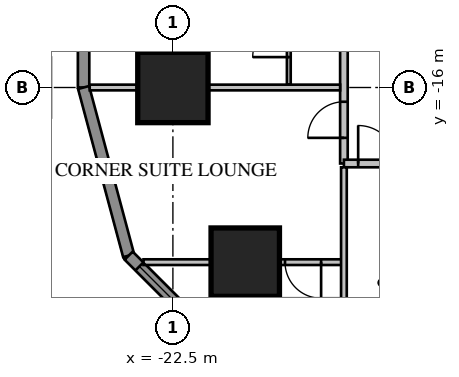
"""IFC4 building model, lengths in metres.
Left out: names, types, materials, properties, quantities, classifications, styles, units other than length and angle.
Written with IfcOpenShell. Run it as: python <this file> out.ifc"""

import sys

from ifc_helpers import new_model, si_unit, direction, frame, frame_2d, origin, origin_2d, place, context, subcontext, project, spatial, rectangle, extrude, element, fill, save


model = new_model("IFC4")
c1 = context("Model", 3, precision=1e-05, world=origin(), true_north=direction((0.0, 1.0)))
c2 = subcontext(c1, "Body", "Model", "MODEL_VIEW")
j1 = project(units=[si_unit("LENGTHUNIT", "METRE"), si_unit("PLANEANGLEUNIT", "RADIAN")], contexts=[c1])
p1 = place(None, origin())
s1 = spatial("IfcSite", under=j1, at=p1, CompositionType="ELEMENT")
p2 = place(p1, origin())
s2 = spatial("IfcBuilding", under=s1, at=p2, CompositionType="ELEMENT")
p3 = place(p2, frame((0.0, 0.0, 35.25)))
s3 = spatial("IfcBuildingStorey", under=s2, at=p3, CompositionType="ELEMENT", Elevation=35.25)
p4 = place(p3, frame((-22.5, -16.0, 0.0), z_axis=(0.0, 0.0, 1.0), x_axis=(1.0, 0.0, 0.0)))
e1 = element("IfcColumn", 1, at=p4, inside=s3, PredefinedType="COLUMN", context=c2, shape_type="SweptSolid", body=[
    extrude(rectangle(XDim=1.85, YDim=1.85, at=origin_2d()), origin(), (0.0, 0.0, 1.0), 3.85),
])
p5 = place(p3, frame((-20.596, -20.596, 0.0), z_axis=(0.0, 0.0, 1.0), x_axis=(1.0, 0.0, 0.0)))
e2 = element("IfcColumn", 2, at=p5, inside=s3, PredefinedType="COLUMN", context=c2, shape_type="SweptSolid", body=[
    extrude(rectangle(XDim=1.8, YDim=1.8, at=origin_2d()), origin(), (0.0, 0.0, 1.0), 3.85),
])
p6 = place(p3, frame((-24.85, 16.0, 0.0), z_axis=(0.0, 0.0, 1.0), x_axis=(0.0, -1.0, 0.0)))
e3 = element("IfcWall", 3, at=p6, inside=s3, PredefinedType="SOLIDWALL", context=c2, shape_type="SweptSolid", body=[
    extrude(rectangle(XDim=32.0, YDim=0.3, at=frame_2d((16.0, 0.0))), origin(), (0.0, 0.0, 1.0), 3.65),
])
p7 = place(p6, frame((1.2, 0.0, 0.75)))
e4 = element("IfcOpeningElement", 4, at=p7, cuts=e3, PredefinedType="OPENING", context=c2, shape_type="SweptSolid", body=[
    extrude(rectangle(XDim=1.6, YDim=1.8, at=frame_2d((0.8, 0.9))), frame((0.0, 0.17, 0.0), z_axis=(0.0, -1.0, 0.0), x_axis=(1.0, 0.0, 0.0)), (0.0, 0.0, 1.0), 0.34),
])
p8 = place(p6, frame((5.2, 0.0, 0.75)))
e5 = element("IfcOpeningElement", 5, at=p8, cuts=e3, PredefinedType="OPENING", context=c2, shape_type="SweptSolid", body=[
    extrude(rectangle(XDim=1.6, YDim=1.8, at=frame_2d((0.8, 0.9))), frame((0.0, 0.17, 0.0), z_axis=(0.0, -1.0, 0.0), x_axis=(1.0, 0.0, 0.0)), (0.0, 0.0, 1.0), 0.34),
])
p9 = place(p6, frame((17.2, 0.0, 0.75)))
e6 = element("IfcOpeningElement", 6, at=p9, cuts=e3, PredefinedType="OPENING", context=c2, shape_type="SweptSolid", body=[
    extrude(rectangle(XDim=1.6, YDim=1.8, at=frame_2d((0.8, 0.9))), frame((0.0, 0.17, 0.0), z_axis=(0.0, -1.0, 0.0), x_axis=(1.0, 0.0, 0.0)), (0.0, 0.0, 1.0), 0.34),
])
p10 = place(p6, frame((21.2, 0.0, 0.75)))
e7 = element("IfcOpeningElement", 7, at=p10, cuts=e3, PredefinedType="OPENING", context=c2, shape_type="SweptSolid", body=[
    extrude(rectangle(XDim=1.6, YDim=1.8, at=frame_2d((0.8, 0.9))), frame((0.0, 0.17, 0.0), z_axis=(0.0, -1.0, 0.0), x_axis=(1.0, 0.0, 0.0)), (0.0, 0.0, 1.0), 0.34),
])
p11 = place(p6, frame((25.2, 0.0, 0.75)))
e8 = element("IfcOpeningElement", 8, at=p11, cuts=e3, PredefinedType="OPENING", context=c2, shape_type="SweptSolid", body=[
    extrude(rectangle(XDim=1.6, YDim=1.8, at=frame_2d((0.8, 0.9))), frame((0.0, 0.17, 0.0), z_axis=(0.0, -1.0, 0.0), x_axis=(1.0, 0.0, 0.0)), (0.0, 0.0, 1.0), 0.34),
])
p12 = place(p6, frame((29.2, 0.0, 0.75)))
e9 = element("IfcOpeningElement", 9, at=p12, cuts=e3, PredefinedType="OPENING", context=c2, shape_type="SweptSolid", body=[
    extrude(rectangle(XDim=1.6, YDim=1.8, at=frame_2d((0.8, 0.9))), frame((0.0, 0.17, 0.0), z_axis=(0.0, -1.0, 0.0), x_axis=(1.0, 0.0, 0.0)), (0.0, 0.0, 1.0), 0.34),
])
p13 = place(p6, frame((8.8, 0.0, 0.75)))
e10 = element("IfcOpeningElement", 10, at=p13, cuts=e3, PredefinedType="OPENING", context=c2, shape_type="SweptSolid", body=[
    extrude(rectangle(XDim=2.4, YDim=1.8, at=frame_2d((1.2, 0.9))), frame((0.0, 0.17, 0.0), z_axis=(0.0, -1.0, 0.0), x_axis=(1.0, 0.0, 0.0)), (0.0, 0.0, 1.0), 0.34),
])
p14 = place(p6, frame((13.812, 0.0, 0.0)))
e11 = element("IfcOpeningElement", 11, at=p14, cuts=e3, PredefinedType="OPENING", context=c2, shape_type="SweptSolid", body=[
    extrude(rectangle(XDim=1.0, YDim=2.4, at=frame_2d((0.5, 1.2))), frame((0.0, 0.17, 0.0), z_axis=(0.0, -1.0, 0.0), x_axis=(1.0, 0.0, 0.0)), (0.0, 0.0, 1.0), 0.34),
])
p15 = place(p3, frame((-24.85, -16.0, 0.0), z_axis=(0.0, 0.0, 1.0), x_axis=(0.258839972501, -0.965920218567, 0.0)))
e12 = element("IfcWall", 12, at=p15, inside=s3, PredefinedType="SOLIDWALL", context=c2, shape_type="SweptSolid", body=[
    extrude(rectangle(XDim=4.581, YDim=0.3, at=frame_2d((2.291, 0.0))), origin(), (0.0, 0.0, 1.0), 3.65),
])
p16 = place(p3, frame((-23.664, -20.425, 0.0), z_axis=(0.0, 0.0, 1.0), x_axis=(0.707106781187, -0.707106781187, 0.0)))
e13 = element("IfcWall", 13, at=p16, inside=s3, PredefinedType="SOLIDWALL", context=c2, shape_type="SweptSolid", body=[
    extrude(rectangle(XDim=4.581, YDim=0.3, at=frame_2d((2.291, 0.0))), origin(), (0.0, 0.0, 1.0), 3.65),
])
p17 = place(p16, frame((0.4, 0.0, 0.75)))
e14 = element("IfcOpeningElement", 14, at=p17, cuts=e13, PredefinedType="OPENING", context=c2, shape_type="SweptSolid", body=[
    extrude(rectangle(XDim=3.781, YDim=1.8, at=frame_2d((1.891, 0.9))), frame((0.0, 0.17, 0.0), z_axis=(0.0, -1.0, 0.0), x_axis=(1.0, 0.0, 0.0)), (0.0, 0.0, 1.0), 0.34),
])
p18 = place(p3, frame((-18.0, 18.0, 0.0), z_axis=(0.0, 0.0, 1.0), x_axis=(0.0, -1.0, 0.0)))
e15 = element("IfcWall", 15, at=p18, inside=s3, PredefinedType="PARTITIONING", context=c2, shape_type="SweptSolid", body=[
    extrude(rectangle(XDim=36.0, YDim=0.2, at=frame_2d((18.0, 0.0))), origin(), (0.0, 0.0, 1.0), 3.65),
])
p19 = place(p18, frame((10.4, 0.0, 0.0)))
e16 = element("IfcOpeningElement", 16, at=p19, cuts=e15, PredefinedType="OPENING", context=c2, shape_type="SweptSolid", body=[
    extrude(rectangle(XDim=1.0, YDim=2.1, at=frame_2d((0.5, 1.05))), frame((0.0, 0.12, 0.0), z_axis=(0.0, -1.0, 0.0), x_axis=(1.0, 0.0, 0.0)), (0.0, 0.0, 1.0), 0.24),
])
p20 = place(p18, frame((0.375, 0.0, 0.0)))
e17 = element("IfcOpeningElement", 17, at=p20, cuts=e15, PredefinedType="OPENING", context=c2, shape_type="SweptSolid", body=[
    extrude(rectangle(XDim=1.0, YDim=2.1, at=frame_2d((0.5, 1.05))), frame((0.0, 0.12, 0.0), z_axis=(0.0, -1.0, 0.0), x_axis=(1.0, 0.0, 0.0)), (0.0, 0.0, 1.0), 0.24),
])
p21 = place(p18, frame((34.375, 0.0, 0.0)))
e18 = element("IfcOpeningElement", 18, at=p21, cuts=e15, PredefinedType="OPENING", context=c2, shape_type="SweptSolid", body=[
    extrude(rectangle(XDim=0.95, YDim=2.1, at=frame_2d((0.475, 1.05))), frame((0.0, 0.12, 0.0), z_axis=(0.0, -1.0, 0.0), x_axis=(1.0, 0.0, 0.0)), (0.0, 0.0, 1.0), 0.24),
])
p22 = place(p3, frame((-19.45, 15.925, 0.0), z_axis=(0.0, 0.0, 1.0), x_axis=(0.0, -1.0, 0.0)))
e19 = element("IfcWall", 19, at=p22, inside=s3, PredefinedType="PARTITIONING", context=c2, shape_type="SweptSolid", body=[
    extrude(rectangle(XDim=31.85, YDim=0.1, at=frame_2d((15.925, 0.0))), origin(), (0.0, 0.0, 1.0), 3.65),
])
p23 = place(p22, frame((10.125, 0.0, 0.0)))
e20 = element("IfcOpeningElement", 20, at=p23, cuts=e19, PredefinedType="OPENING", context=c2, shape_type="SweptSolid", body=[
    extrude(rectangle(XDim=1.0, YDim=2.1, at=frame_2d((0.5, 1.05))), frame((0.0, 0.07, 0.0), z_axis=(0.0, -1.0, 0.0), x_axis=(1.0, 0.0, 0.0)), (0.0, 0.0, 1.0), 0.14),
])
p24 = place(p22, frame((8.3, 0.0, 0.0)))
e21 = element("IfcOpeningElement", 21, at=p24, cuts=e19, PredefinedType="OPENING", context=c2, shape_type="SweptSolid", body=[
    extrude(rectangle(XDim=0.8, YDim=2.1, at=frame_2d((0.4, 1.05))), frame((0.0, 0.07, 0.0), z_axis=(0.0, -1.0, 0.0), x_axis=(1.0, 0.0, 0.0)), (0.0, 0.0, 1.0), 0.14),
])
p25 = place(p22, frame((0.3, 0.0, 0.0)))
e22 = element("IfcOpeningElement", 22, at=p25, cuts=e19, PredefinedType="OPENING", context=c2, shape_type="SweptSolid", body=[
    extrude(rectangle(XDim=0.95, YDim=2.1, at=frame_2d((0.475, 1.05))), frame((0.0, 0.07, 0.0), z_axis=(0.0, -1.0, 0.0), x_axis=(1.0, 0.0, 0.0)), (0.0, 0.0, 1.0), 0.14),
])
p26 = place(p22, frame((6.175, 0.0, 0.0)))
e23 = element("IfcOpeningElement", 23, at=p26, cuts=e19, PredefinedType="OPENING", context=c2, shape_type="SweptSolid", body=[
    extrude(rectangle(XDim=0.95, YDim=2.1, at=frame_2d((0.475, 1.05))), frame((0.0, 0.07, 0.0), z_axis=(0.0, -1.0, 0.0), x_axis=(1.0, 0.0, 0.0)), (0.0, 0.0, 1.0), 0.14),
])
p27 = place(p22, frame((16.3, 0.0, 0.0)))
e24 = element("IfcOpeningElement", 24, at=p27, cuts=e19, PredefinedType="OPENING", context=c2, shape_type="SweptSolid", body=[
    extrude(rectangle(XDim=0.95, YDim=2.1, at=frame_2d((0.475, 1.05))), frame((0.0, 0.07, 0.0), z_axis=(0.0, -1.0, 0.0), x_axis=(1.0, 0.0, 0.0)), (0.0, 0.0, 1.0), 0.14),
])
p28 = place(p22, frame((22.175, 0.0, 0.0)))
e25 = element("IfcOpeningElement", 25, at=p28, cuts=e19, PredefinedType="OPENING", context=c2, shape_type="SweptSolid", body=[
    extrude(rectangle(XDim=0.95, YDim=2.1, at=frame_2d((0.475, 1.05))), frame((0.0, 0.07, 0.0), z_axis=(0.0, -1.0, 0.0), x_axis=(1.0, 0.0, 0.0)), (0.0, 0.0, 1.0), 0.14),
])
p29 = place(p22, frame((24.3, 0.0, 0.0)))
e26 = element("IfcOpeningElement", 26, at=p29, cuts=e19, PredefinedType="OPENING", context=c2, shape_type="SweptSolid", body=[
    extrude(rectangle(XDim=0.95, YDim=2.1, at=frame_2d((0.475, 1.05))), frame((0.0, 0.07, 0.0), z_axis=(0.0, -1.0, 0.0), x_axis=(1.0, 0.0, 0.0)), (0.0, 0.0, 1.0), 0.14),
])
p30 = place(p22, frame((30.175, 0.0, 0.0)))
e27 = element("IfcOpeningElement", 27, at=p30, cuts=e19, PredefinedType="OPENING", context=c2, shape_type="SweptSolid", body=[
    extrude(rectangle(XDim=0.95, YDim=2.1, at=frame_2d((0.475, 1.05))), frame((0.0, 0.07, 0.0), z_axis=(0.0, -1.0, 0.0), x_axis=(1.0, 0.0, 0.0)), (0.0, 0.0, 1.0), 0.14),
])
p31 = place(p3, frame((-18.1, -16.0, 0.0), z_axis=(0.0, 0.0, 1.0), x_axis=(-1.0, 0.0, 0.0)))
e28 = element("IfcWall", 28, at=p31, inside=s3, PredefinedType="PARTITIONING", context=c2, shape_type="SweptSolid", body=[
    extrude(rectangle(XDim=6.589, YDim=0.15, at=frame_2d((3.295, 0.0))), origin(), (0.0, 0.0, 1.0), 3.65),
])
p32 = place(p3, frame((-18.065, -20.596, 0.0), z_axis=(0.0, 0.0, 1.0), x_axis=(-1.0, 0.0, 0.0)))
e29 = element("IfcWall", 29, at=p32, inside=s3, PredefinedType="PARTITIONING", context=c2, shape_type="SweptSolid", body=[
    extrude(rectangle(XDim=5.209, YDim=0.15, at=frame_2d((2.604, 0.0))), origin(), (0.0, 0.0, 1.0), 3.65),
])
p33 = place(p32, frame((0.535, 0.0, 0.0)))
e30 = element("IfcOpeningElement", 30, at=p33, cuts=e29, PredefinedType="OPENING", context=c2, shape_type="SweptSolid", body=[
    extrude(rectangle(XDim=0.95, YDim=2.1, at=frame_2d((0.475, 1.05))), frame((0.0, 0.095, 0.0), z_axis=(0.0, -1.0, 0.0), x_axis=(1.0, 0.0, 0.0)), (0.0, 0.0, 1.0), 0.19),
])
p34 = place(p3, frame((-18.0, -18.0, 0.0), z_axis=(0.0, 0.0, 1.0), x_axis=(1.0, 0.0, 0.0)))
e31 = element("IfcWall", 31, at=p34, inside=s3, PredefinedType="PARTITIONING", context=c2, shape_type="SweptSolid", body=[
    extrude(rectangle(XDim=36.0, YDim=0.2, at=frame_2d((18.0, 0.0))), origin(), (0.0, 0.0, 1.0), 3.65),
])
p35 = place(p34, frame((0.375, 0.0, 0.0)))
e32 = element("IfcOpeningElement", 32, at=p35, cuts=e31, PredefinedType="OPENING", context=c2, shape_type="SweptSolid", body=[
    extrude(rectangle(XDim=1.0, YDim=2.1, at=frame_2d((0.5, 1.05))), frame((0.0, 0.12, 0.0), z_axis=(0.0, -1.0, 0.0), x_axis=(1.0, 0.0, 0.0)), (0.0, 0.0, 1.0), 0.24),
])
p36 = place(p34, frame((2.45, 0.0, 0.0)))
e33 = element("IfcOpeningElement", 33, at=p36, cuts=e31, PredefinedType="OPENING", context=c2, shape_type="SweptSolid", body=[
    extrude(rectangle(XDim=0.8, YDim=2.1, at=frame_2d((0.4, 1.05))), frame((0.0, 0.12, 0.0), z_axis=(0.0, -1.0, 0.0), x_axis=(1.0, 0.0, 0.0)), (0.0, 0.0, 1.0), 0.24),
])
p37 = place(p34, frame((4.05, 0.0, 0.0)))
e34 = element("IfcOpeningElement", 34, at=p37, cuts=e31, PredefinedType="OPENING", context=c2, shape_type="SweptSolid", body=[
    extrude(rectangle(XDim=1.0, YDim=2.1, at=frame_2d((0.5, 1.05))), frame((0.0, 0.12, 0.0), z_axis=(0.0, -1.0, 0.0), x_axis=(1.0, 0.0, 0.0)), (0.0, 0.0, 1.0), 0.24),
])
p38 = place(p34, frame((6.45, 0.0, 0.0)))
e35 = element("IfcOpeningElement", 35, at=p38, cuts=e31, PredefinedType="OPENING", context=c2, shape_type="SweptSolid", body=[
    extrude(rectangle(XDim=0.9, YDim=2.1, at=frame_2d((0.45, 1.05))), frame((0.0, 0.12, 0.0), z_axis=(0.0, -1.0, 0.0), x_axis=(1.0, 0.0, 0.0)), (0.0, 0.0, 1.0), 0.24),
])
p39 = place(p34, frame((8.15, 0.0, 0.0)))
e36 = element("IfcOpeningElement", 36, at=p39, cuts=e31, PredefinedType="OPENING", context=c2, shape_type="SweptSolid", body=[
    extrude(rectangle(XDim=1.0, YDim=2.1, at=frame_2d((0.5, 1.05))), frame((0.0, 0.12, 0.0), z_axis=(0.0, -1.0, 0.0), x_axis=(1.0, 0.0, 0.0)), (0.0, 0.0, 1.0), 0.24),
])
p40 = place(p34, frame((18.375, 0.0, 0.0)))
e37 = element("IfcOpeningElement", 37, at=p40, cuts=e31, PredefinedType="OPENING", context=c2, shape_type="SweptSolid", body=[
    extrude(rectangle(XDim=0.95, YDim=2.1, at=frame_2d((0.475, 1.05))), frame((0.0, 0.12, 0.0), z_axis=(0.0, -1.0, 0.0), x_axis=(1.0, 0.0, 0.0)), (0.0, 0.0, 1.0), 0.24),
])
p41 = place(p34, frame((24.25, 0.0, 0.0)))
e38 = element("IfcOpeningElement", 38, at=p41, cuts=e31, PredefinedType="OPENING", context=c2, shape_type="SweptSolid", body=[
    extrude(rectangle(XDim=0.95, YDim=2.1, at=frame_2d((0.475, 1.05))), frame((0.0, 0.12, 0.0), z_axis=(0.0, -1.0, 0.0), x_axis=(1.0, 0.0, 0.0)), (0.0, 0.0, 1.0), 0.24),
])
p42 = place(p34, frame((26.375, 0.0, 0.0)))
e39 = element("IfcOpeningElement", 39, at=p42, cuts=e31, PredefinedType="OPENING", context=c2, shape_type="SweptSolid", body=[
    extrude(rectangle(XDim=0.95, YDim=2.1, at=frame_2d((0.475, 1.05))), frame((0.0, 0.12, 0.0), z_axis=(0.0, -1.0, 0.0), x_axis=(1.0, 0.0, 0.0)), (0.0, 0.0, 1.0), 0.24),
])
p43 = place(p34, frame((32.25, 0.0, 0.0)))
e40 = element("IfcOpeningElement", 40, at=p43, cuts=e31, PredefinedType="OPENING", context=c2, shape_type="SweptSolid", body=[
    extrude(rectangle(XDim=0.95, YDim=2.1, at=frame_2d((0.475, 1.05))), frame((0.0, 0.12, 0.0), z_axis=(0.0, -1.0, 0.0), x_axis=(1.0, 0.0, 0.0)), (0.0, 0.0, 1.0), 0.24),
])
p44 = place(p34, frame((34.375, 0.0, 0.0)))
e41 = element("IfcOpeningElement", 41, at=p44, cuts=e31, PredefinedType="OPENING", context=c2, shape_type="SweptSolid", body=[
    extrude(rectangle(XDim=0.95, YDim=2.1, at=frame_2d((0.475, 1.05))), frame((0.0, 0.12, 0.0), z_axis=(0.0, -1.0, 0.0), x_axis=(1.0, 0.0, 0.0)), (0.0, 0.0, 1.0), 0.24),
])
p45 = place(p34, frame((11.2, 0.0, 0.0)))
e42 = element("IfcOpeningElement", 42, at=p45, cuts=e31, PredefinedType="OPENING", context=c2, shape_type="SweptSolid", body=[
    extrude(rectangle(XDim=1.0, YDim=2.1, at=frame_2d((0.5, 1.05))), frame((0.0, 0.12, 0.0), z_axis=(0.0, -1.0, 0.0), x_axis=(1.0, 0.0, 0.0)), (0.0, 0.0, 1.0), 0.24),
])
p46 = place(p3, frame((-18.0, -18.1, 0.0), z_axis=(0.0, 0.0, 1.0), x_axis=(0.0, -1.0, 0.0)))
e43 = element("IfcWall", 43, at=p46, inside=s3, PredefinedType="PARTITIONING", context=c2, shape_type="SweptSolid", body=[
    extrude(rectangle(XDim=6.053, YDim=0.15, at=frame_2d((3.027, 0.0))), origin(), (0.0, 0.0, 1.0), 3.65),
])
p47 = place(p17, origin())
e44 = element("IfcWindow", 44, at=p47, inside=s3, PartitioningType="SINGLE_PANEL", PredefinedType="WINDOW", context=c2, shape_type="SweptSolid", body=[
    extrude(rectangle(XDim=3.781, YDim=1.8, at=frame_2d((1.891, 0.9))), frame((0.0, 0.03, 0.0), z_axis=(0.0, -1.0, 0.0), x_axis=(1.0, 0.0, 0.0)), (0.0, 0.0, 1.0), 0.06),
])
fill(e14, e44)
p48 = place(p30, origin())
e45 = element("IfcDoor", 45, at=p48, inside=s3, OperationType="SINGLE_SWING_RIGHT", PredefinedType="DOOR", context=c2, shape_type="SweptSolid", body=[
    extrude(rectangle(XDim=0.95, YDim=2.1, at=frame_2d((0.475, 1.05))), frame((0.0, 0.025, 0.0), z_axis=(0.0, -1.0, 0.0), x_axis=(1.0, 0.0, 0.0)), (0.0, 0.0, 1.0), 0.05),
])
fill(e27, e45)
p49 = place(p21, origin())
e46 = element("IfcDoor", 46, at=p49, inside=s3, OperationType="SINGLE_SWING_RIGHT", PredefinedType="DOOR", context=c2, shape_type="SweptSolid", body=[
    extrude(rectangle(XDim=0.95, YDim=2.1, at=frame_2d((0.475, 1.05))), frame((0.0, 0.025, 0.0), z_axis=(0.0, -1.0, 0.0), x_axis=(1.0, 0.0, 0.0)), (0.0, 0.0, 1.0), 0.05),
])
fill(e18, e46)
p50 = place(p33, origin())
e47 = element("IfcDoor", 47, at=p50, inside=s3, OperationType="SINGLE_SWING_LEFT", PredefinedType="DOOR", context=c2, shape_type="SweptSolid", body=[
    extrude(rectangle(XDim=0.95, YDim=2.1, at=frame_2d((0.475, 1.05))), frame((0.0, 0.025, 0.0), z_axis=(0.0, -1.0, 0.0), x_axis=(1.0, 0.0, 0.0)), (0.0, 0.0, 1.0), 0.05),
])
fill(e30, e47)
p51 = place(p35, origin())
e48 = element("IfcDoor", 48, at=p51, inside=s3, OperationType="SINGLE_SWING_LEFT", PredefinedType="DOOR", context=c2, shape_type="SweptSolid", body=[
    extrude(rectangle(XDim=1.0, YDim=2.1, at=frame_2d((0.5, 1.05))), frame((0.0, 0.025, 0.0), z_axis=(0.0, -1.0, 0.0), x_axis=(1.0, 0.0, 0.0)), (0.0, 0.0, 1.0), 0.05),
])
fill(e32, e48)
save(model, sys.argv[1])
